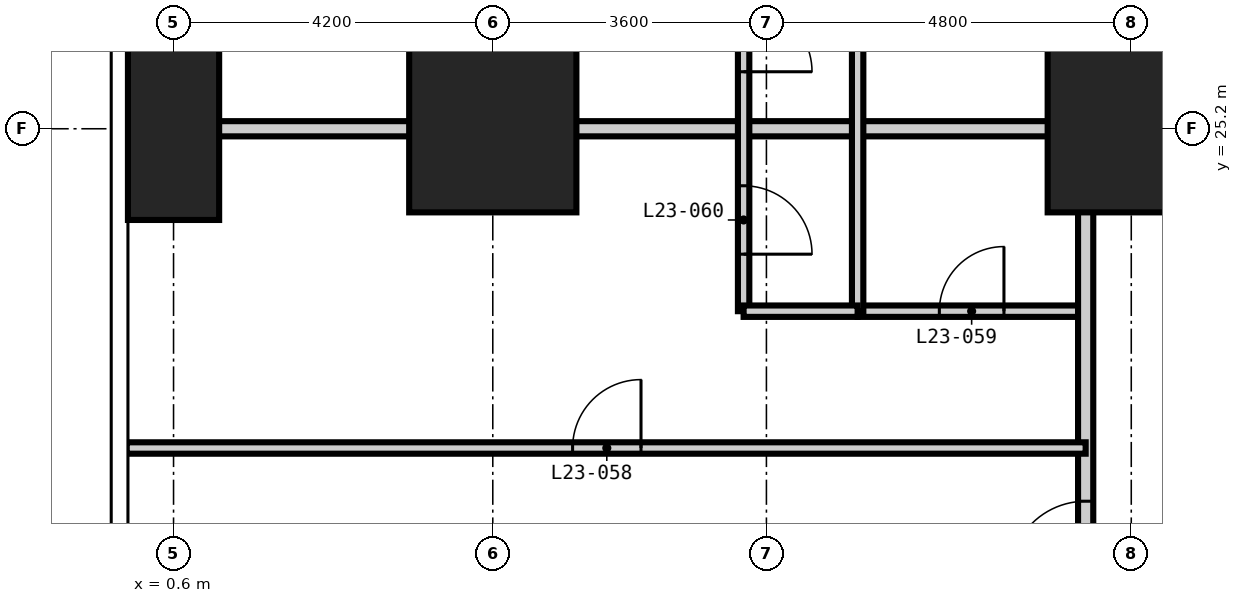
"""IFC4 building model, lengths in metres.
Left out: names, types, materials, properties, quantities, classifications, styles, units other than length and angle.
Written with IfcOpenShell. Run it as: python <this file> out.ifc"""

import sys

from ifc_helpers import new_model, si_unit, direction, frame, frame_2d, origin, origin_2d, place, context, subcontext, project, spatial, rectangle, extrude, element, fill, save


model = new_model("IFC4")
c1 = context("Model", 3, precision=1e-05, world=origin(), true_north=direction((0.0, 1.0)))
c2 = subcontext(c1, "Body", "Model", "MODEL_VIEW")
j1 = project(units=[si_unit("LENGTHUNIT", "METRE"), si_unit("PLANEANGLEUNIT", "RADIAN")], contexts=[c1])
p1 = place(None, origin())
s1 = spatial("IfcSite", under=j1, at=p1, CompositionType="ELEMENT")
p2 = place(p1, origin())
s2 = spatial("IfcBuilding", under=s1, at=p2, CompositionType="ELEMENT")
p3 = place(p2, frame((0.0, 0.0, 93.6)))
s3 = spatial("IfcBuildingStorey", under=s2, at=p3, CompositionType="ELEMENT", Elevation=93.6)
p4 = place(p3, frame((0.6, 25.2, -0.35), z_axis=(0.0, 0.0, 1.0), x_axis=(1.0, 0.0, 0.0)))
e1 = element("IfcColumn", 1, at=p4, inside=s3, PredefinedType="COLUMN", context=c2, shape_type="SweptSolid", body=[
    extrude(rectangle(XDim=1.2, YDim=2.4, at=origin_2d()), origin(), (0.0, 0.0, 1.0), 3.6),
])
for number, where, z_axis, x_axis in (
    (2, (4.8, 25.2, -0.35), (0.0, 0.0, 1.0), (1.0, 0.0, 0.0)),
    (3, (13.2, 25.2, -0.35), (0.0, 0.0, 1.0), (1.0, 0.0, 0.0)),
):
    element("IfcColumn", number, at=place(p3, frame(where, z_axis=z_axis, x_axis=x_axis)), inside=s3, PredefinedType="COLUMN", context=c2, shape_type="SweptSolid", body=[
        extrude(rectangle(XDim=2.2, YDim=2.2, at=origin_2d()), origin(), (0.0, 0.0, 1.0), 3.6),
    ])
p5 = place(p3, frame((9.6, 22.8, 0.0), z_axis=(0.0, 0.0, 1.0), x_axis=(1.0, 0.0, 0.0)))
e4 = element("IfcWall", 4, at=p5, inside=s3, PredefinedType="PARTITIONING", context=c2, shape_type="SweptSolid", body=[
    extrude(rectangle(XDim=3.0, YDim=0.15, at=frame_2d((1.5, 0.0))), origin(), (0.0, 0.0, 1.0), 3.25),
])
p6 = place(p5, frame((1.075, 0.0, 0.0)))
e5 = element("IfcOpeningElement", 5, at=p6, cuts=e4, PredefinedType="OPENING", context=c2, shape_type="SweptSolid", body=[
    extrude(rectangle(XDim=0.85, YDim=2.1, at=frame_2d((0.425, 1.05))), frame((0.0, 0.085, 0.0), z_axis=(0.0, -1.0, 0.0), x_axis=(1.0, 0.0, 0.0)), (0.0, 0.0, 1.0), 0.17),
])
p7 = place(p3, frame((12.6, 13.1, 0.0), z_axis=(0.0, 0.0, 1.0), x_axis=(0.0, 1.0, 0.0)))
e6 = element("IfcWall", 6, at=p7, inside=s3, PredefinedType="PARTITIONING", context=c2, shape_type="SweptSolid", body=[
    extrude(rectangle(XDim=31.4, YDim=0.2, at=frame_2d((15.7, 0.0))), origin(), (0.0, 0.0, 1.0), 3.25),
])
p8 = place(p7, frame((6.2, 0.0, 0.0)))
e7 = element("IfcOpeningElement", 7, at=p8, cuts=e6, PredefinedType="OPENING", context=c2, shape_type="SweptSolid", body=[
    extrude(rectangle(XDim=1.0, YDim=2.2, at=frame_2d((0.5, 1.1))), frame((0.0, 0.11, 0.0), z_axis=(0.0, -1.0, 0.0), x_axis=(1.0, 0.0, 0.0)), (0.0, 0.0, 1.0), 0.22),
])
p9 = place(p7, frame((17.0, 0.0, 0.0)))
e8 = element("IfcOpeningElement", 8, at=p9, cuts=e6, PredefinedType="OPENING", context=c2, shape_type="SweptSolid", body=[
    extrude(rectangle(XDim=1.0, YDim=2.2, at=frame_2d((0.5, 1.1))), frame((0.0, 0.11, 0.0), z_axis=(0.0, -1.0, 0.0), x_axis=(1.0, 0.0, 0.0)), (0.0, 0.0, 1.0), 0.22),
])
p10 = place(p7, frame((23.0, 0.0, 0.0)))
e9 = element("IfcOpeningElement", 9, at=p10, cuts=e6, PredefinedType="OPENING", context=c2, shape_type="SweptSolid", body=[
    extrude(rectangle(XDim=1.0, YDim=2.2, at=frame_2d((0.5, 1.1))), frame((0.0, 0.11, 0.0), z_axis=(0.0, -1.0, 0.0), x_axis=(1.0, 0.0, 0.0)), (0.0, 0.0, 1.0), 0.22),
])
p11 = place(p7, frame((1.35, 0.0, 0.0)))
e10 = element("IfcOpeningElement", 10, at=p11, cuts=e6, PredefinedType="OPENING", context=c2, shape_type="SweptSolid", body=[
    extrude(rectangle(XDim=1.0, YDim=2.2, at=frame_2d((0.5, 1.1))), frame((0.0, 0.11, 0.0), z_axis=(0.0, -1.0, 0.0), x_axis=(1.0, 0.0, 0.0)), (0.0, 0.0, 1.0), 0.22),
])
p12 = place(p7, frame((30.05, 0.0, 0.0)))
e11 = element("IfcOpeningElement", 11, at=p12, cuts=e6, PredefinedType="OPENING", context=c2, shape_type="SweptSolid", body=[
    extrude(rectangle(XDim=1.0, YDim=2.2, at=frame_2d((0.5, 1.1))), frame((0.0, 0.11, 0.0), z_axis=(0.0, -1.0, 0.0), x_axis=(1.0, 0.0, 0.0)), (0.0, 0.0, 1.0), 0.22),
])
p13 = place(p3, frame((-0.018, 25.2, 0.0), z_axis=(0.0, 0.0, 1.0), x_axis=(1.0, 0.0, 0.0)))
e12 = element("IfcWall", 12, at=p13, inside=s3, PredefinedType="PARTITIONING", context=c2, shape_type="SweptSolid", body=[
    extrude(rectangle(XDim=12.618, YDim=0.2, at=frame_2d((6.309, 0.0))), origin(), (0.0, 0.0, 1.0), 3.25),
])
p14 = place(p3, frame((8.1, 22.8, 0.0), z_axis=(0.0, 0.0, 1.0), x_axis=(0.0, 1.0, 0.0)))
e13 = element("IfcWall", 13, at=p14, inside=s3, PredefinedType="PARTITIONING", context=c2, shape_type="SweptSolid", body=[
    extrude(rectangle(XDim=4.8, YDim=0.15, at=frame_2d((2.4, 0.0))), origin(), (0.0, 0.0, 1.0), 3.25),
])
p15 = place(p14, frame((0.75, 0.0, 0.0)))
e14 = element("IfcOpeningElement", 14, at=p15, cuts=e13, PredefinedType="OPENING", context=c2, shape_type="SweptSolid", body=[
    extrude(rectangle(XDim=0.9, YDim=2.1, at=frame_2d((0.45, 1.05))), frame((0.0, 0.085, 0.0), z_axis=(0.0, -1.0, 0.0), x_axis=(1.0, 0.0, 0.0)), (0.0, 0.0, 1.0), 0.17),
])
p16 = place(p14, frame((3.15, 0.0, 0.0)))
e15 = element("IfcOpeningElement", 15, at=p16, cuts=e13, PredefinedType="OPENING", context=c2, shape_type="SweptSolid", body=[
    extrude(rectangle(XDim=0.9, YDim=2.1, at=frame_2d((0.45, 1.05))), frame((0.0, 0.085, 0.0), z_axis=(0.0, -1.0, 0.0), x_axis=(1.0, 0.0, 0.0)), (0.0, 0.0, 1.0), 0.17),
])
p17 = place(p3, frame((9.6, 22.8, 0.0), z_axis=(0.0, 0.0, 1.0), x_axis=(0.0, 1.0, 0.0)))
e16 = element("IfcWall", 16, at=p17, inside=s3, PredefinedType="PARTITIONING", context=c2, shape_type="SweptSolid", body=[
    extrude(rectangle(XDim=4.8, YDim=0.15, at=frame_2d((2.4, 0.0))), origin(), (0.0, 0.0, 1.0), 3.25),
])
p18 = place(p3, frame((-0.018, 21.0, 0.0), z_axis=(0.0, 0.0, 1.0), x_axis=(1.0, 0.0, 0.0)))
e17 = element("IfcWall", 17, at=p18, inside=s3, PredefinedType="PARTITIONING", context=c2, shape_type="SweptSolid", body=[
    extrude(rectangle(XDim=12.618, YDim=0.15, at=frame_2d((6.309, 0.0))), origin(), (0.0, 0.0, 1.0), 3.25),
])
p19 = place(p18, frame((5.868, 0.0, 0.0)))
e18 = element("IfcOpeningElement", 18, at=p19, cuts=e17, PredefinedType="OPENING", context=c2, shape_type="SweptSolid", body=[
    extrude(rectangle(XDim=0.9, YDim=2.1, at=frame_2d((0.45, 1.05))), frame((0.0, 0.085, 0.0), z_axis=(0.0, -1.0, 0.0), x_axis=(1.0, 0.0, 0.0)), (0.0, 0.0, 1.0), 0.17),
])
p20 = place(p3, frame((8.1, 22.8, 0.0), z_axis=(0.0, 0.0, 1.0), x_axis=(1.0, 0.0, 0.0)))
e19 = element("IfcWall", 19, at=p20, inside=s3, PredefinedType="PARTITIONING", context=c2, shape_type="SweptSolid", body=[
    extrude(rectangle(XDim=1.5, YDim=0.15, at=frame_2d((0.75, 0.0))), origin(), (0.0, 0.0, 1.0), 3.25),
])
p21 = place(p8, origin())
e20 = element("IfcDoor", 20, at=p21, inside=s3, OperationType="SINGLE_SWING_LEFT", PredefinedType="DOOR", context=c2, shape_type="SweptSolid", body=[
    extrude(rectangle(XDim=1.0, YDim=2.2, at=frame_2d((0.5, 1.1))), frame((0.0, 0.025, 0.0), z_axis=(0.0, -1.0, 0.0), x_axis=(1.0, 0.0, 0.0)), (0.0, 0.0, 1.0), 0.05),
])
fill(e7, e20)
p22 = place(p19, origin())
e21 = element("IfcDoor", 21, at=p22, inside=s3, OperationType="SINGLE_SWING_RIGHT", PredefinedType="DOOR", context=c2, shape_type="SweptSolid", body=[
    extrude(rectangle(XDim=0.9, YDim=2.1, at=frame_2d((0.45, 1.05))), frame((0.0, 0.025, 0.0), z_axis=(0.0, -1.0, 0.0), x_axis=(1.0, 0.0, 0.0)), (0.0, 0.0, 1.0), 0.05),
])
fill(e18, e21)
p23 = place(p6, origin())
e22 = element("IfcDoor", 22, at=p23, inside=s3, OperationType="SINGLE_SWING_RIGHT", PredefinedType="DOOR", context=c2, shape_type="SweptSolid", body=[
    extrude(rectangle(XDim=0.85, YDim=2.1, at=frame_2d((0.425, 1.05))), frame((0.0, 0.025, 0.0), z_axis=(0.0, -1.0, 0.0), x_axis=(1.0, 0.0, 0.0)), (0.0, 0.0, 1.0), 0.05),
])
fill(e5, e22)
p24 = place(p15, frame((0.9, 0.0, 0.0), z_axis=(0.0, 0.0, 1.0), x_axis=(-1.0, 0.0, 0.0)))
e23 = element("IfcDoor", 23, at=p24, inside=s3, OperationType="SINGLE_SWING_RIGHT", PredefinedType="DOOR", context=c2, shape_type="SweptSolid", body=[
    extrude(rectangle(XDim=0.9, YDim=2.1, at=frame_2d((0.45, 1.05))), frame((0.0, 0.025, 0.0), z_axis=(0.0, -1.0, 0.0), x_axis=(1.0, 0.0, 0.0)), (0.0, 0.0, 1.0), 0.05),
])
fill(e14, e23)
p25 = place(p16, frame((0.9, 0.0, 0.0), z_axis=(0.0, 0.0, 1.0), x_axis=(-1.0, 0.0, 0.0)))
e24 = element("IfcDoor", 24, at=p25, inside=s3, OperationType="SINGLE_SWING_RIGHT", PredefinedType="DOOR", context=c2, shape_type="SweptSolid", body=[
    extrude(rectangle(XDim=0.9, YDim=2.1, at=frame_2d((0.45, 1.05))), frame((0.0, 0.025, 0.0), z_axis=(0.0, -1.0, 0.0), x_axis=(1.0, 0.0, 0.0)), (0.0, 0.0, 1.0), 0.05),
])
fill(e15, e24)
save(model, sys.argv[1])
